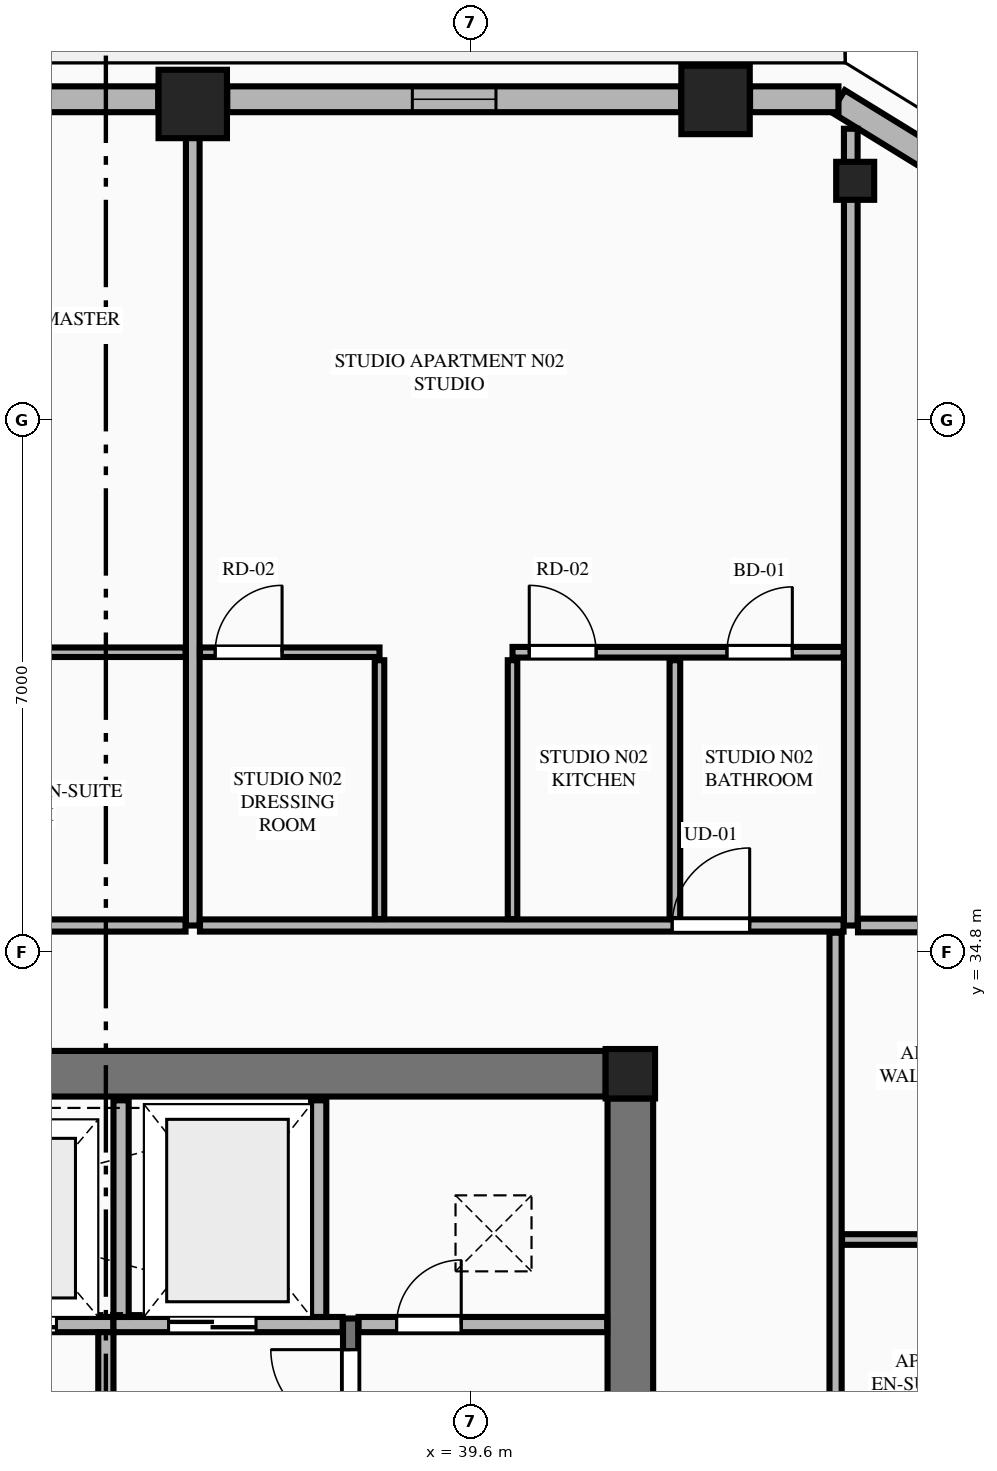
"""IFC4 building model, lengths in metres.
Left out: names, types, materials, properties, quantities, classifications, styles, units other than length and angle.
Written with IfcOpenShell. Run it as: python <this file> out.ifc"""

import sys

from ifc_helpers import new_model, si_unit, direction, frame, frame_2d, origin, origin_2d, place, context, subcontext, project, spatial, rectangle, extrude, element, fill, save


model = new_model("IFC4")
c1 = context("Model", 3, precision=1e-05, world=origin(), true_north=direction((0.0, 1.0)))
c2 = subcontext(c1, "Body", "Model", "MODEL_VIEW")
j1 = project(units=[si_unit("LENGTHUNIT", "METRE"), si_unit("PLANEANGLEUNIT", "RADIAN")], contexts=[c1])
p1 = place(None, origin())
s1 = spatial("IfcSite", under=j1, at=p1, CompositionType="ELEMENT")
p2 = place(p1, origin())
s2 = spatial("IfcBuilding", under=s1, at=p2, CompositionType="ELEMENT")
p3 = place(p2, frame((0.0, 0.0, 182.55)))
s3 = spatial("IfcBuildingStorey", under=s2, at=p3, CompositionType="ELEMENT", Elevation=182.55)
p4 = place(p3, frame((41.7, 33.2, 0.0), z_axis=(0.0, 0.0, 1.0), x_axis=(1.0, 0.0, 0.0)))
e1 = element("IfcColumn", 1, at=p4, inside=s3, PredefinedType="COLUMN", context=c2, shape_type="SweptSolid", body=[
    extrude(rectangle(XDim=0.65, YDim=0.65, at=origin_2d()), origin(), (0.0, 0.0, 1.0), 3.55),
])
p5 = place(p3, frame((23.425, 33.2, 0.0), z_axis=(0.0, 0.0, 1.0), x_axis=(1.0, 0.0, 0.0)))
e2 = element("IfcWall", 2, at=p5, inside=s3, PredefinedType="SHEAR", context=c2, shape_type="SweptSolid", body=[
    extrude(rectangle(XDim=17.95, YDim=0.6, at=frame_2d((8.975, 0.0))), origin(), (0.0, 0.0, 1.0), 3.35),
])
p6 = place(p3, frame((41.7, 18.925, 0.0), z_axis=(0.0, 0.0, 1.0), x_axis=(0.0, 1.0, 0.0)))
e3 = element("IfcWall", 3, at=p6, inside=s3, PredefinedType="SHEAR", context=c2, shape_type="SweptSolid", body=[
    extrude(rectangle(XDim=13.95, YDim=0.6, at=frame_2d((6.975, 0.0))), origin(), (0.0, 0.0, 1.0), 3.35),
])
p7 = place(p6, frame((2.915, 0.0, 0.0)))
e4 = element("IfcOpeningElement", 4, at=p7, cuts=e3, PredefinedType="OPENING", context=c2, shape_type="SweptSolid", body=[
    extrude(rectangle(XDim=1.22, YDim=2.25, at=frame_2d((0.61, 1.125))), frame((0.0, 0.31, 0.0), z_axis=(0.0, -1.0, 0.0), x_axis=(1.0, 0.0, 0.0)), (0.0, 0.0, 1.0), 0.62),
])
for number, where, z_axis, x_axis in (
    (5, (42.821, 46.011, 0.0), (0.0, 0.0, 1.0), (1.0, 0.0, 0.0)),
    (6, (35.943, 45.958, 0.0), (0.0, 0.0, 1.0), (1.0, 0.0, 0.0)),
):
    element("IfcColumn", number, at=place(p3, frame(where, z_axis=z_axis, x_axis=x_axis)), inside=s3, PredefinedType="COLUMN", context=c2, shape_type="SweptSolid", body=[
        extrude(rectangle(XDim=0.9, YDim=0.9, at=origin_2d()), origin(), (0.0, 0.0, 1.0), 3.55),
    ])
p8 = place(p3, frame((44.658, 44.947, 0.0), z_axis=(0.0, 0.0, 1.0), x_axis=(-0.865230187018, 0.501374833306, 0.0)))
e7 = element("IfcColumn", 7, at=p8, inside=s3, PredefinedType="PILASTER", context=c2, shape_type="SweptSolid", body=[
    extrude(rectangle(XDim=0.5, YDim=0.35, at=origin_2d()), origin(), (0.0, 0.0, 1.0), 3.55),
])
p9 = place(p3, frame((38.02, 23.2, 0.0), z_axis=(0.0, 0.0, 1.0), x_axis=(0.0, 1.0, 0.0)))
e8 = element("IfcWall", 8, at=p9, inside=s3, PredefinedType="SHEAR", context=c2, shape_type="SweptSolid", body=[
    extrude(rectangle(XDim=6.78, YDim=0.2, at=frame_2d((3.39, 0.0))), origin(), (0.0, 0.0, 1.0), 3.55),
])
p10 = place(p9, frame((5.32, 0.0, 0.0)))
e9 = element("IfcOpeningElement", 9, at=p10, cuts=e8, PredefinedType="OPENING", context=c2, shape_type="SweptSolid", body=[
    extrude(rectangle(XDim=1.05, YDim=2.15, at=frame_2d((0.525, 1.075))), frame((0.0, 0.11, 0.0), z_axis=(0.0, -1.0, 0.0), x_axis=(1.0, 0.0, 0.0)), (0.0, 0.0, 1.0), 0.22),
])
p11 = place(p3, frame((29.9, 29.9, 0.0), z_axis=(0.0, 0.0, 1.0), x_axis=(1.0, 0.0, 0.0)))
e10 = element("IfcWall", 10, at=p11, inside=s3, PredefinedType="PLUMBINGWALL", context=c2, shape_type="SweptSolid", body=[
    extrude(rectangle(XDim=5.0, YDim=0.2, at=frame_2d((2.5, 0.0))), origin(), (0.0, 0.0, 1.0), 3.35),
])
p12 = place(p11, frame((0.75, 0.0, 0.0)))
e11 = element("IfcOpeningElement", 11, at=p12, cuts=e10, PredefinedType="OPENING", context=c2, shape_type="SweptSolid", body=[
    extrude(rectangle(XDim=1.1, YDim=2.2, at=frame_2d((0.55, 1.1))), frame((0.0, 0.11, 0.0), z_axis=(0.0, -1.0, 0.0), x_axis=(1.0, 0.0, 0.0)), (0.0, 0.0, 1.0), 0.22),
])
p13 = place(p11, frame((3.15, 0.0, 0.0)))
e12 = element("IfcOpeningElement", 12, at=p13, cuts=e10, PredefinedType="OPENING", context=c2, shape_type="SweptSolid", body=[
    extrude(rectangle(XDim=1.1, YDim=2.2, at=frame_2d((0.55, 1.1))), frame((0.0, 0.11, 0.0), z_axis=(0.0, -1.0, 0.0), x_axis=(1.0, 0.0, 0.0)), (0.0, 0.0, 1.0), 0.22),
])
p14 = place(p3, frame((34.9, 29.9, 0.0), z_axis=(0.0, 0.0, 1.0), x_axis=(1.0, 0.0, 0.0)))
e13 = element("IfcWall", 13, at=p14, inside=s3, PredefinedType="PLUMBINGWALL", context=c2, shape_type="SweptSolid", body=[
    extrude(rectangle(XDim=3.015, YDim=0.2, at=frame_2d((1.508, 0.0))), origin(), (0.0, 0.0, 1.0), 3.35),
])
p15 = place(p14, frame((0.725, 0.0, 0.0)))
e14 = element("IfcOpeningElement", 14, at=p15, cuts=e13, PredefinedType="OPENING", context=c2, shape_type="SweptSolid", body=[
    extrude(rectangle(XDim=1.15, YDim=2.2, at=frame_2d((0.575, 1.1))), frame((0.0, 0.11, 0.0), z_axis=(0.0, -1.0, 0.0), x_axis=(1.0, 0.0, 0.0)), (0.0, 0.0, 1.0), 0.22),
])
p16 = place(p3, frame((38.125, 29.9, 0.0), z_axis=(0.0, 0.0, 1.0), x_axis=(1.0, 0.0, 0.0)))
e15 = element("IfcWall", 15, at=p16, inside=s3, PredefinedType="PLUMBINGWALL", context=c2, shape_type="SweptSolid", body=[
    extrude(rectangle(XDim=3.27, YDim=0.2, at=frame_2d((1.635, 0.0))), origin(), (0.0, 0.0, 1.0), 3.35),
])
p17 = place(p16, frame((0.5, 0.0, 0.0)))
e16 = element("IfcOpeningElement", 16, at=p17, cuts=e15, PredefinedType="OPENING", context=c2, shape_type="SweptSolid", body=[
    extrude(rectangle(XDim=0.85, YDim=2.05, at=frame_2d((0.425, 1.025))), frame((0.0, 0.11, 0.0), z_axis=(0.0, -1.0, 0.0), x_axis=(1.0, 0.0, 0.0)), (0.0, 0.0, 1.0), 0.22),
])
for number, where, z_axis, x_axis in (
    (17, (35.0, 30.0, 0.0), (0.0, 0.0, 1.0), (0.0, 1.0, 0.0)),
    (18, (37.6, 30.0, 0.0), (0.0, 0.0, 1.0), (0.0, 1.0, 0.0)),
):
    element("IfcWall", number, at=place(p3, frame(where, z_axis=z_axis, x_axis=x_axis)), inside=s3, PredefinedType="PLUMBINGWALL", context=c2, shape_type="SweptSolid", body=[
        extrude(rectangle(XDim=2.85, YDim=0.2, at=frame_2d((1.425, 0.0))), origin(), (0.0, 0.0, 1.0), 3.35),
    ])
p18 = place(p3, frame((34.8, 27.05, 0.0), z_axis=(0.0, 0.0, 1.0), x_axis=(0.0, 1.0, 0.0)))
e19 = element("IfcWall", 19, at=p18, inside=s3, PredefinedType="PLUMBINGWALL", context=c2, shape_type="SweptSolid", body=[
    extrude(rectangle(XDim=2.75, YDim=0.2, at=frame_2d((1.375, 0.0))), origin(), (0.0, 0.0, 1.0), 3.35),
])
p19 = place(p18, frame((0.85, 0.0, 0.0)))
e20 = element("IfcOpeningElement", 20, at=p19, cuts=e19, PredefinedType="OPENING", context=c2, shape_type="SweptSolid", body=[
    extrude(rectangle(XDim=1.0, YDim=2.15, at=frame_2d((0.5, 1.075))), frame((0.0, 0.11, 0.0), z_axis=(0.0, -1.0, 0.0), x_axis=(1.0, 0.0, 0.0)), (0.0, 0.0, 1.0), 0.22),
])
p20 = place(p3, frame((45.862, 45.116, 0.0), z_axis=(0.0, 0.0, 1.0), x_axis=(-0.851713271379, 0.524008113828, 0.0)))
e21 = element("IfcWall", 21, at=p20, inside=s3, PredefinedType="STANDARD", context=c2, shape_type="SweptSolid", body=[
    extrude(rectangle(XDim=1.678, YDim=0.34, at=frame_2d((0.839, 0.0))), origin(), (0.0, 0.0, 1.0), 3.35),
])
p21 = place(p3, frame((44.438, 46.02, 0.0), z_axis=(0.0, 0.0, 1.0), x_axis=(-1.0, 0.0, 0.0)))
e22 = element("IfcWall", 22, at=p21, inside=s3, PredefinedType="STANDARD", context=c2, shape_type="SweptSolid", body=[
    extrude(rectangle(XDim=1.163, YDim=0.34, at=frame_2d((0.582, 0.0))), origin(), (0.0, 0.0, 1.0), 3.35),
])
p22 = place(p3, frame((42.367, 46.02, 0.0), z_axis=(0.0, 0.0, 1.0), x_axis=(-1.0, 0.0, 0.0)))
e23 = element("IfcWall", 23, at=p22, inside=s3, PredefinedType="STANDARD", context=c2, shape_type="SweptSolid", body=[
    extrude(rectangle(XDim=5.97, YDim=0.34, at=frame_2d((2.985, 0.0))), origin(), (0.0, 0.0, 1.0), 2.883),
])
p23 = place(p22, frame((2.435, 0.0, 0.75)))
e24 = element("IfcOpeningElement", 24, at=p23, cuts=e23, PredefinedType="OPENING", context=c2, shape_type="SweptSolid", body=[
    extrude(rectangle(XDim=1.1, YDim=1.983, at=frame_2d((0.55, 0.991))), frame((0.0, 0.18, 0.0), z_axis=(0.0, -1.0, 0.0), x_axis=(1.0, 0.0, 0.0)), (0.0, 0.0, 1.0), 0.36),
])
p24 = place(p3, frame((35.489, 46.02, 0.0), z_axis=(0.0, 0.0, 1.0), x_axis=(-1.0, 0.0, 0.0)))
e25 = element("IfcWall", 25, at=p24, inside=s3, PredefinedType="STANDARD", context=c2, shape_type="SweptSolid", body=[
    extrude(rectangle(XDim=6.178, YDim=0.34, at=frame_2d((3.089, 0.0))), origin(), (0.0, 0.0, 1.0), 2.883),
])
p25 = place(p24, frame((1.668, 0.0, 0.0)))
e26 = element("IfcOpeningElement", 26, at=p25, cuts=e25, PredefinedType="OPENING", context=c2, shape_type="SweptSolid", body=[
    extrude(rectangle(XDim=1.1, YDim=2.25, at=frame_2d((0.55, 1.125))), frame((0.0, 0.18, 0.0), z_axis=(0.0, -1.0, 0.0), x_axis=(1.0, 0.0, 0.0)), (0.0, 0.0, 1.0), 0.36),
])
p26 = place(p24, frame((4.872, 0.0, 0.75)))
e27 = element("IfcOpeningElement", 27, at=p26, cuts=e25, PredefinedType="OPENING", context=c2, shape_type="SweptSolid", body=[
    extrude(rectangle(XDim=1.086, YDim=1.983, at=frame_2d((0.543, 0.991))), frame((0.0, 0.18, 0.0), z_axis=(0.0, -1.0, 0.0), x_axis=(1.0, 0.0, 0.0)), (0.0, 0.0, 1.0), 0.36),
])
p27 = place(p3, frame((35.943, 35.15, 0.0), z_axis=(0.0, 0.0, 1.0), x_axis=(0.0, 1.0, 0.0)))
e28 = element("IfcWall", 28, at=p27, inside=s3, PredefinedType="PARTITIONING", context=c2, shape_type="SweptSolid", body=[
    extrude(rectangle(XDim=10.695, YDim=0.18, at=frame_2d((5.348, 0.0))), origin(), (0.0, 0.0, 1.0), 2.807),
])
p28 = place(p3, frame((44.6, 35.15, 0.0), z_axis=(0.0, 0.0, 1.0), x_axis=(0.0, 1.0, 0.0)))
e29 = element("IfcWall", 29, at=p28, inside=s3, PredefinedType="PARTITIONING", context=c2, shape_type="SweptSolid", body=[
    extrude(rectangle(XDim=10.482, YDim=0.18, at=frame_2d((5.241, 0.0))), origin(), (0.0, 0.0, 1.0), 3.35),
])
p29 = place(p3, frame((20.295, 35.15, 0.0), z_axis=(0.0, 0.0, 1.0), x_axis=(1.0, 0.0, 0.0)))
e30 = element("IfcWall", 30, at=p29, inside=s3, PredefinedType="PARTITIONING", context=c2, shape_type="SweptSolid", body=[
    extrude(rectangle(XDim=15.553, YDim=0.16, at=frame_2d((7.776, 0.0))), origin(), (0.0, 0.0, 1.0), 3.35),
])
p30 = place(p29, frame((0.405, 0.0, 0.0)))
e31 = element("IfcOpeningElement", 31, at=p30, cuts=e30, PredefinedType="OPENING", context=c2, shape_type="SweptSolid", body=[
    extrude(rectangle(XDim=1.02, YDim=2.25, at=frame_2d((0.51, 1.125))), frame((0.0, 0.09, 0.0), z_axis=(0.0, -1.0, 0.0), x_axis=(1.0, 0.0, 0.0)), (0.0, 0.0, 1.0), 0.18),
])
p31 = place(p3, frame((30.95, 38.745, 0.0), z_axis=(0.0, 0.0, 1.0), x_axis=(1.0, 0.0, 0.0)))
e32 = element("IfcWall", 32, at=p31, inside=s3, PredefinedType="PARTITIONING", context=c2, shape_type="SweptSolid", body=[
    extrude(rectangle(XDim=4.898, YDim=0.125, at=frame_2d((2.449, 0.0))), origin(), (0.0, 0.0, 1.0), 3.35),
])
p32 = place(p31, frame((2.024, 0.0, 0.0)))
e33 = element("IfcOpeningElement", 33, at=p32, cuts=e32, PredefinedType="OPENING", context=c2, shape_type="SweptSolid", body=[
    extrude(rectangle(XDim=0.86, YDim=2.1, at=frame_2d((0.43, 1.05))), frame((0.0, 0.073, 0.0), z_axis=(0.0, -1.0, 0.0), x_axis=(1.0, 0.0, 0.0)), (0.0, 0.0, 1.0), 0.145),
])
p33 = place(p3, frame((36.038, 35.15, 0.0), z_axis=(0.0, 0.0, 1.0), x_axis=(1.0, 0.0, 0.0)))
e34 = element("IfcWall", 34, at=p33, inside=s3, PredefinedType="PARTITIONING", context=c2, shape_type="SweptSolid", body=[
    extrude(rectangle(XDim=8.467, YDim=0.16, at=frame_2d((4.233, 0.0))), origin(), (0.0, 0.0, 1.0), 3.35),
])
p34 = place(p33, frame((6.212, 0.0, 0.0)))
e35 = element("IfcOpeningElement", 35, at=p34, cuts=e34, PredefinedType="OPENING", context=c2, shape_type="SweptSolid", body=[
    extrude(rectangle(XDim=1.02, YDim=2.25, at=frame_2d((0.51, 1.125))), frame((0.0, 0.09, 0.0), z_axis=(0.0, -1.0, 0.0), x_axis=(1.0, 0.0, 0.0)), (0.0, 0.0, 1.0), 0.18),
])
p35 = place(p3, frame((40.15, 35.235, 0.0), z_axis=(0.0, 0.0, 1.0), x_axis=(0.0, 1.0, 0.0)))
e36 = element("IfcWall", 36, at=p35, inside=s3, PredefinedType="PARTITIONING", context=c2, shape_type="SweptSolid", body=[
    extrude(rectangle(XDim=3.405, YDim=0.125, at=frame_2d((1.702, 0.0))), origin(), (0.0, 0.0, 1.0), 3.35),
])
p36 = place(p3, frame((40.15, 38.745, 0.0), z_axis=(0.0, 0.0, 1.0), x_axis=(1.0, 0.0, 0.0)))
e37 = element("IfcWall", 37, at=p36, inside=s3, PredefinedType="PLUMBINGWALL", context=c2, shape_type="SweptSolid", body=[
    extrude(rectangle(XDim=4.355, YDim=0.14, at=frame_2d((2.177, 0.0))), origin(), (0.0, 0.0, 1.0), 3.35),
])
p37 = place(p36, frame((2.821, 0.0, 0.0)))
e38 = element("IfcOpeningElement", 38, at=p37, cuts=e37, PredefinedType="OPENING", context=c2, shape_type="SweptSolid", body=[
    extrude(rectangle(XDim=0.86, YDim=2.1, at=frame_2d((0.43, 1.05))), frame((0.0, 0.08, 0.0), z_axis=(0.0, -1.0, 0.0), x_axis=(1.0, 0.0, 0.0)), (0.0, 0.0, 1.0), 0.16),
])
p38 = place(p36, frame((0.22, 0.0, 0.0)))
e39 = element("IfcOpeningElement", 39, at=p38, cuts=e37, PredefinedType="OPENING", context=c2, shape_type="SweptSolid", body=[
    extrude(rectangle(XDim=0.88, YDim=2.15, at=frame_2d((0.44, 1.075))), frame((0.0, 0.08, 0.0), z_axis=(0.0, -1.0, 0.0), x_axis=(1.0, 0.0, 0.0)), (0.0, 0.0, 1.0), 0.16),
])
p39 = place(p3, frame((42.286, 35.235, 0.0), z_axis=(0.0, 0.0, 1.0), x_axis=(0.0, 1.0, 0.0)))
e40 = element("IfcWall", 40, at=p39, inside=s3, PredefinedType="PLUMBINGWALL", context=c2, shape_type="SweptSolid", body=[
    extrude(rectangle(XDim=3.405, YDim=0.14, at=frame_2d((1.702, 0.0))), origin(), (0.0, 0.0, 1.0), 2.807),
])
p40 = place(p3, frame((38.4, 35.235, 0.0), z_axis=(0.0, 0.0, 1.0), x_axis=(0.0, 1.0, 0.0)))
e41 = element("IfcWall", 41, at=p40, inside=s3, PredefinedType="PARTITIONING", context=c2, shape_type="SweptSolid", body=[
    extrude(rectangle(XDim=3.405, YDim=0.125, at=frame_2d((1.702, 0.0))), origin(), (0.0, 0.0, 1.0), 3.35),
])
p41 = place(p3, frame((36.038, 38.745, 0.0), z_axis=(0.0, 0.0, 1.0), x_axis=(1.0, 0.0, 0.0)))
e42 = element("IfcWall", 42, at=p41, inside=s3, PredefinedType="PARTITIONING", context=c2, shape_type="SweptSolid", body=[
    extrude(rectangle(XDim=2.362, YDim=0.125, at=frame_2d((1.181, 0.0))), origin(), (0.0, 0.0, 1.0), 3.35),
])
p42 = place(p41, frame((0.2, 0.0, 0.0)))
e43 = element("IfcOpeningElement", 43, at=p42, cuts=e42, PredefinedType="OPENING", context=c2, shape_type="SweptSolid", body=[
    extrude(rectangle(XDim=0.88, YDim=2.15, at=frame_2d((0.44, 1.075))), frame((0.0, 0.073, 0.0), z_axis=(0.0, -1.0, 0.0), x_axis=(1.0, 0.0, 0.0)), (0.0, 0.0, 1.0), 0.145),
])
p43 = place(p3, frame((44.695, 35.15, 0.0), z_axis=(0.0, 0.0, 1.0), x_axis=(1.0, 0.0, 0.0)))
e44 = element("IfcWall", 44, at=p43, inside=s3, PredefinedType="PARTITIONING", context=c2, shape_type="SweptSolid", body=[
    extrude(rectangle(XDim=5.995, YDim=0.18, at=frame_2d((2.998, 0.0))), origin(), (0.0, 0.0, 1.0), 3.35),
])
p44 = place(p3, frame((44.4, 16.345, 0.0), z_axis=(0.0, 0.0, 1.0), x_axis=(0.0, 1.0, 0.0)))
e45 = element("IfcWall", 45, at=p44, inside=s3, PredefinedType="PARTITIONING", context=c2, shape_type="SweptSolid", body=[
    extrude(rectangle(XDim=18.71, YDim=0.16, at=frame_2d((9.355, 0.0))), origin(), (0.0, 0.0, 1.0), 3.35),
])
p45 = place(p44, frame((0.45, 0.0, 0.0)))
e46 = element("IfcOpeningElement", 46, at=p45, cuts=e45, PredefinedType="OPENING", context=c2, shape_type="SweptSolid", body=[
    extrude(rectangle(XDim=1.02, YDim=2.25, at=frame_2d((0.51, 1.125))), frame((0.0, 0.09, 0.0), z_axis=(0.0, -1.0, 0.0), x_axis=(1.0, 0.0, 0.0)), (0.0, 0.0, 1.0), 0.18),
])
p46 = place(p3, frame((44.485, 31.019, 0.0), z_axis=(0.0, 0.0, 1.0), x_axis=(1.0, 0.0, 0.0)))
e47 = element("IfcWall", 47, at=p46, inside=s3, PredefinedType="PLUMBINGWALL", context=c2, shape_type="SweptSolid", body=[
    extrude(rectangle(XDim=3.68, YDim=0.14, at=frame_2d((1.84, 0.0))), origin(), (0.0, 0.0, 1.0), 3.35),
])
p47 = place(p10, origin())
e48 = element("IfcDoor", 48, at=p47, inside=s3, OperationType="SINGLE_SWING_RIGHT", PredefinedType="DOOR", context=c2, shape_type="SweptSolid", body=[
    extrude(rectangle(XDim=1.05, YDim=2.15, at=frame_2d((0.525, 1.075))), frame((0.0, 0.025, 0.0), z_axis=(0.0, -1.0, 0.0), x_axis=(1.0, 0.0, 0.0)), (0.0, 0.0, 1.0), 0.05),
])
fill(e9, e48)
p48 = place(p17, origin())
e49 = element("IfcDoor", 49, at=p48, inside=s3, OperationType="SINGLE_SWING_RIGHT", PredefinedType="DOOR", context=c2, shape_type="SweptSolid", body=[
    extrude(rectangle(XDim=0.85, YDim=2.05, at=frame_2d((0.425, 1.025))), frame((0.0, 0.025, 0.0), z_axis=(0.0, -1.0, 0.0), x_axis=(1.0, 0.0, 0.0)), (0.0, 0.0, 1.0), 0.05),
])
fill(e16, e49)
p49 = place(p15, origin())
e50 = element("IfcDoor", 50, at=p49, inside=s3, OperationType="DOUBLE_DOOR_SLIDING", PredefinedType="DOOR", context=c2, shape_type="SweptSolid", body=[
    extrude(rectangle(XDim=1.15, YDim=2.2, at=frame_2d((0.575, 1.1))), frame((0.0, 0.025, 0.0), z_axis=(0.0, -1.0, 0.0), x_axis=(1.0, 0.0, 0.0)), (0.0, 0.0, 1.0), 0.05),
])
fill(e14, e50)
p50 = place(p13, origin())
e51 = element("IfcDoor", 51, at=p50, inside=s3, OperationType="DOUBLE_DOOR_SLIDING", PredefinedType="DOOR", context=c2, shape_type="SweptSolid", body=[
    extrude(rectangle(XDim=1.1, YDim=2.2, at=frame_2d((0.55, 1.1))), frame((0.0, 0.025, 0.0), z_axis=(0.0, -1.0, 0.0), x_axis=(1.0, 0.0, 0.0)), (0.0, 0.0, 1.0), 0.05),
])
fill(e12, e51)
p51 = place(p23, origin())
e52 = element("IfcWindow", 52, at=p51, inside=s3, PartitioningType="SINGLE_PANEL", PredefinedType="WINDOW", context=c2, shape_type="SweptSolid", body=[
    extrude(rectangle(XDim=1.1, YDim=1.983, at=frame_2d((0.55, 0.991))), frame((0.0, 0.03, 0.0), z_axis=(0.0, -1.0, 0.0), x_axis=(1.0, 0.0, 0.0)), (0.0, 0.0, 1.0), 0.06),
])
fill(e24, e52)
p52 = place(p42, origin())
e53 = element("IfcDoor", 53, at=p52, inside=s3, OperationType="SINGLE_SWING_RIGHT", PredefinedType="DOOR", context=c2, shape_type="SweptSolid", body=[
    extrude(rectangle(XDim=0.88, YDim=2.15, at=frame_2d((0.44, 1.075))), frame((0.0, 0.025, 0.0), z_axis=(0.0, -1.0, 0.0), x_axis=(1.0, 0.0, 0.0)), (0.0, 0.0, 1.0), 0.05),
])
fill(e43, e53)
p53 = place(p37, origin())
e54 = element("IfcDoor", 54, at=p53, inside=s3, OperationType="SINGLE_SWING_RIGHT", PredefinedType="DOOR", context=c2, shape_type="SweptSolid", body=[
    extrude(rectangle(XDim=0.86, YDim=2.1, at=frame_2d((0.43, 1.05))), frame((0.0, 0.025, 0.0), z_axis=(0.0, -1.0, 0.0), x_axis=(1.0, 0.0, 0.0)), (0.0, 0.0, 1.0), 0.05),
])
fill(e38, e54)
p54 = place(p34, origin())
e55 = element("IfcDoor", 55, at=p54, inside=s3, OperationType="SINGLE_SWING_RIGHT", PredefinedType="DOOR", context=c2, shape_type="SweptSolid", body=[
    extrude(rectangle(XDim=1.02, YDim=2.25, at=frame_2d((0.51, 1.125))), frame((0.0, 0.025, 0.0), z_axis=(0.0, -1.0, 0.0), x_axis=(1.0, 0.0, 0.0)), (0.0, 0.0, 1.0), 0.05),
])
fill(e35, e55)
p55 = place(p38, origin())
e56 = element("IfcDoor", 56, at=p55, inside=s3, OperationType="SINGLE_SWING_LEFT", PredefinedType="DOOR", context=c2, shape_type="SweptSolid", body=[
    extrude(rectangle(XDim=0.88, YDim=2.15, at=frame_2d((0.44, 1.075))), frame((0.0, 0.025, 0.0), z_axis=(0.0, -1.0, 0.0), x_axis=(1.0, 0.0, 0.0)), (0.0, 0.0, 1.0), 0.05),
])
fill(e39, e56)
save(model, sys.argv[1])
